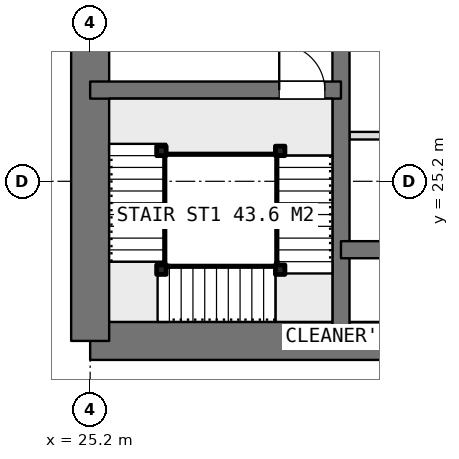
"""IFC4 building model, lengths in metres.
Left out: names, types, materials, properties, quantities, classifications, styles, units other than length and angle.
Written with IfcOpenShell. Run it as: python <this file> out.ifc"""

import sys

from ifc_helpers import new_model, si_unit, direction, frame, frame_2d, origin, origin_2d, place, context, subcontext, project, spatial, rectangle, extrude, element, fill, save


model = new_model("IFC4")
c1 = context("Model", 3, precision=1e-05, world=origin(), true_north=direction((0.0, 1.0)))
c2 = subcontext(c1, "Body", "Model", "MODEL_VIEW")
j1 = project(units=[si_unit("LENGTHUNIT", "METRE"), si_unit("PLANEANGLEUNIT", "RADIAN")], contexts=[c1])
p1 = place(None, origin())
s1 = spatial("IfcSite", under=j1, at=p1, CompositionType="ELEMENT")
p2 = place(p1, origin())
s2 = spatial("IfcBuilding", under=s1, at=p2, CompositionType="ELEMENT")
p3 = place(p2, frame((0.0, 0.0, 121.55)))
s3 = spatial("IfcBuildingStorey", under=s2, at=p3, CompositionType="ELEMENT", Elevation=121.55)
p4 = place(p3, frame((25.2, 21.0, 0.0), z_axis=(0.0, 0.0, 1.0), x_axis=(1.0, 0.0, 0.0)))
e1 = element("IfcWall", 1, at=p4, inside=s3, PredefinedType="SHEAR", context=c2, shape_type="SweptSolid", body=[
    extrude(rectangle(XDim=10.4, YDim=1.0, at=frame_2d((5.2, 0.0))), origin(), (0.0, 0.0, 1.0), 3.75),
])
p5 = place(p3, frame((25.2, 21.0, 0.0), z_axis=(0.0, 0.0, 1.0), x_axis=(0.0, 1.0, 0.0)))
e2 = element("IfcWall", 2, at=p5, inside=s3, PredefinedType="SHEAR", context=c2, shape_type="SweptSolid", body=[
    extrude(rectangle(XDim=25.2, YDim=1.0, at=frame_2d((12.6, 0.0))), origin(), (0.0, 0.0, 1.0), 3.75),
])
p6 = place(p5, frame((7.8, 0.0, 0.0)))
e3 = element("IfcOpeningElement", 3, at=p6, cuts=e2, PredefinedType="OPENING", context=c2, shape_type="SweptSolid", body=[
    extrude(rectangle(XDim=1.2, YDim=2.1, at=frame_2d((0.6, 1.05))), frame((0.0, 0.51, 0.0), z_axis=(0.0, -1.0, 0.0), x_axis=(1.0, 0.0, 0.0)), (0.0, 0.0, 1.0), 1.02),
])
p7 = place(p5, frame((14.25, 0.0, 0.0)))
e4 = element("IfcOpeningElement", 4, at=p7, cuts=e2, PredefinedType="OPENING", context=c2, shape_type="SweptSolid", body=[
    extrude(rectangle(XDim=0.9, YDim=2.1, at=frame_2d((0.45, 1.05))), frame((0.0, 0.51, 0.0), z_axis=(0.0, -1.0, 0.0), x_axis=(1.0, 0.0, 0.0)), (0.0, 0.0, 1.0), 1.02),
])
p8 = place(p5, frame((16.85, 0.0, 0.0)))
e5 = element("IfcOpeningElement", 5, at=p8, cuts=e2, PredefinedType="OPENING", context=c2, shape_type="SweptSolid", body=[
    extrude(rectangle(XDim=0.9, YDim=2.1, at=frame_2d((0.45, 1.05))), frame((0.0, 0.51, 0.0), z_axis=(0.0, -1.0, 0.0), x_axis=(1.0, 0.0, 0.0)), (0.0, 0.0, 1.0), 1.02),
])
p9 = place(p5, frame((19.025, 0.0, 0.0)))
e6 = element("IfcOpeningElement", 6, at=p9, cuts=e2, PredefinedType="OPENING", context=c2, shape_type="SweptSolid", body=[
    extrude(rectangle(XDim=1.2, YDim=2.1, at=frame_2d((0.6, 1.05))), frame((0.0, 0.51, 0.0), z_axis=(0.0, -1.0, 0.0), x_axis=(1.0, 0.0, 0.0)), (0.0, 0.0, 1.0), 1.02),
])
p10 = place(p3, frame((31.8, 21.0, 0.0), z_axis=(0.0, 0.0, 1.0), x_axis=(0.0, 1.0, 0.0)))
e7 = element("IfcWall", 7, at=p10, inside=s3, PredefinedType="SHEAR", context=c2, shape_type="SweptSolid", body=[
    extrude(rectangle(XDim=25.2, YDim=0.45, at=frame_2d((12.6, 0.0))), origin(), (0.0, 0.0, 1.0), 3.75),
])
p11 = place(p3, frame((31.8, 23.4, 0.0), z_axis=(0.0, 0.0, 1.0), x_axis=(1.0, 0.0, 0.0)))
e8 = element("IfcWall", 8, at=p11, inside=s3, PredefinedType="SHEAR", context=c2, shape_type="SweptSolid", body=[
    extrude(rectangle(XDim=3.8, YDim=0.45, at=frame_2d((1.9, 0.0))), origin(), (0.0, 0.0, 1.0), 3.75),
])
p12 = place(p3, frame((25.2, 27.6, 0.0), z_axis=(0.0, 0.0, 1.0), x_axis=(1.0, 0.0, 0.0)))
e9 = element("IfcWall", 9, at=p12, inside=s3, PredefinedType="SHEAR", context=c2, shape_type="SweptSolid", body=[
    extrude(rectangle(XDim=6.6, YDim=0.45, at=frame_2d((3.3, 0.0))), origin(), (0.0, 0.0, 1.0), 3.75),
])
p13 = place(p12, frame((4.975, 0.0, 0.0)))
e10 = element("IfcOpeningElement", 10, at=p13, cuts=e9, PredefinedType="OPENING", context=c2, shape_type="SweptSolid", body=[
    extrude(rectangle(XDim=1.2, YDim=2.1, at=frame_2d((0.6, 1.05))), frame((0.0, 0.235, 0.0), z_axis=(0.0, -1.0, 0.0), x_axis=(1.0, 0.0, 0.0)), (0.0, 0.0, 1.0), 0.47),
])
p14 = place(p3, frame((32.025, 26.4, 0.0), z_axis=(0.0, 0.0, 1.0), x_axis=(1.0, 0.0, 0.0)))
e11 = element("IfcWall", 11, at=p14, inside=s3, PredefinedType="PARTITIONING", context=c2, shape_type="SweptSolid", body=[
    extrude(rectangle(XDim=3.35, YDim=0.2, at=frame_2d((1.675, 0.0))), origin(), (0.0, 0.0, 1.0), 3.5),
])
for number, where, z_axis, x_axis in (
    (12, (30.2, 26.0, 0.0), (0.0, 0.0, 1.0), (1.0, 0.0, 0.0)),
    (13, (30.2, 22.875, 0.0), (0.0, 0.0, 1.0), (1.0, 0.0, 0.0)),
    (14, (27.075, 22.875, 0.0), (0.0, 0.0, 1.0), (1.0, 0.0, 0.0)),
    (15, (27.075, 26.0, 0.0), (0.0, 0.0, 1.0), (1.0, 0.0, 0.0)),
):
    element("IfcColumn", number, at=place(p3, frame(where, z_axis=z_axis, x_axis=x_axis)), inside=s3, PredefinedType="COLUMN", context=c2, shape_type="SweptSolid", body=[
        extrude(rectangle(XDim=0.25, YDim=0.25, at=origin_2d()), origin(), (0.0, 0.0, 1.0), 3.75),
    ])
p15 = place(p13, origin())
e16 = element("IfcDoor", 16, at=p15, inside=s3, OperationType="SINGLE_SWING_RIGHT", PredefinedType="DOOR", context=c2, shape_type="SweptSolid", body=[
    extrude(rectangle(XDim=1.2, YDim=2.1, at=frame_2d((0.6, 1.05))), frame((0.0, 0.025, 0.0), z_axis=(0.0, -1.0, 0.0), x_axis=(1.0, 0.0, 0.0)), (0.0, 0.0, 1.0), 0.05),
])
fill(e10, e16)
save(model, sys.argv[1])
